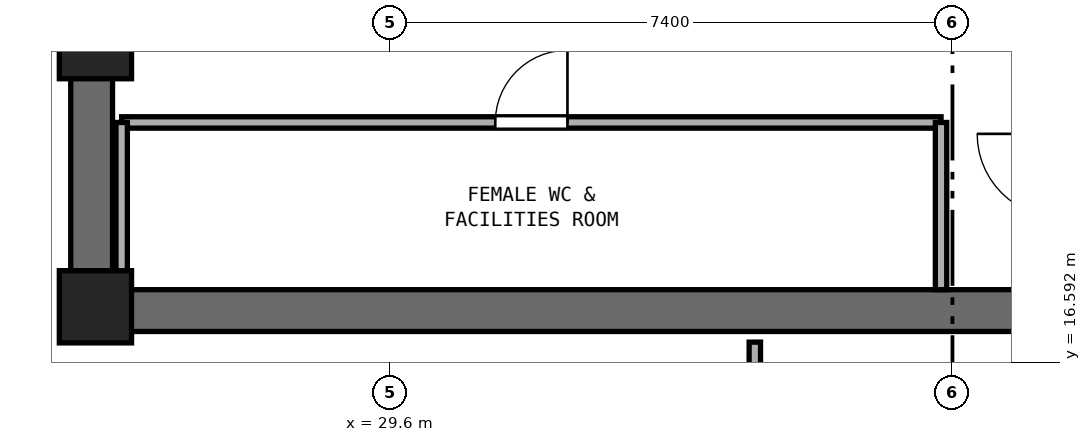
"""IFC4 building model, lengths in metres.
Left out: names, types, materials, properties, quantities, classifications, styles, units other than length and angle.
Written with IfcOpenShell. Run it as: python <this file> out.ifc"""

import sys

from ifc_helpers import new_model, si_unit, direction, frame, frame_2d, origin, origin_2d, place, context, subcontext, project, spatial, rectangle, extrude, element, fill, save


model = new_model("IFC4")
c1 = context("Model", 3, precision=1e-05, world=origin(), true_north=direction((0.0, 1.0)))
c2 = subcontext(c1, "Body", "Model", "MODEL_VIEW")
j1 = project(units=[si_unit("LENGTHUNIT", "METRE"), si_unit("PLANEANGLEUNIT", "RADIAN")], contexts=[c1])
p1 = place(None, origin())
s1 = spatial("IfcSite", under=j1, at=p1, CompositionType="ELEMENT")
p2 = place(p1, origin())
s2 = spatial("IfcBuilding", under=s1, at=p2, CompositionType="ELEMENT")
p3 = place(p2, frame((0.0, 0.0, 140.2)))
s3 = spatial("IfcBuildingStorey", under=s2, at=p3, CompositionType="ELEMENT", Elevation=140.2)
p4 = place(p3, frame((25.4, 17.275, 0.0), z_axis=(0.0, 0.0, 1.0), x_axis=(1.0, 0.0, 0.0)))
e1 = element("IfcWall", 1, at=p4, inside=s3, PredefinedType="SHEAR", context=c2, shape_type="SweptSolid", body=[
    extrude(rectangle(XDim=23.2, YDim=0.55, at=frame_2d((11.6, 0.0))), origin(), (0.0, 0.0, 1.0), 3.54),
])
p5 = place(p3, frame((25.675, 17.55, 0.0), z_axis=(0.0, 0.0, 1.0), x_axis=(0.0, 1.0, 0.0)))
e2 = element("IfcWall", 2, at=p5, inside=s3, PredefinedType="SHEAR", context=c2, shape_type="SweptSolid", body=[
    extrude(rectangle(XDim=15.3, YDim=0.55, at=frame_2d((7.65, 0.0))), origin(), (0.0, 0.0, 1.0), 3.54),
])
p6 = place(p5, frame((6.9, 0.0, 0.0)))
e3 = element("IfcOpeningElement", 3, at=p6, cuts=e2, PredefinedType="OPENING", context=c2, shape_type="SweptSolid", body=[
    extrude(rectangle(XDim=1.5, YDim=2.15, at=frame_2d((0.75, 1.075))), frame((0.0, 0.285, 0.0), z_axis=(0.0, -1.0, 0.0), x_axis=(1.0, 0.0, 0.0)), (0.0, 0.0, 1.0), 0.57),
])
for number, where, z_axis, x_axis in (
    (4, (25.725, 17.325, 0.0), (0.0, 0.0, 1.0), (1.0, 0.0, 0.0)),
    (5, (25.725, 20.8, 0.0), (0.0, 0.0, 1.0), (1.0, 0.0, 0.0)),
):
    element("IfcColumn", number, at=place(p3, frame(where, z_axis=z_axis, x_axis=x_axis)), inside=s3, PredefinedType="PILASTER", context=c2, shape_type="SweptSolid", body=[
        extrude(rectangle(XDim=0.95, YDim=0.95, at=origin_2d()), origin(), (0.0, 0.0, 1.0), 3.8),
    ])
p7 = place(p3, frame((26.07, 19.75, 0.0), z_axis=(0.0, 0.0, 1.0), x_axis=(1.0, 0.0, 0.0)))
e6 = element("IfcWall", 6, at=p7, inside=s3, PredefinedType="PARTITIONING", context=c2, shape_type="SweptSolid", body=[
    extrude(rectangle(XDim=10.78, YDim=0.15, at=frame_2d((5.39, 0.0))), origin(), (0.0, 0.0, 1.0), 3.54),
])
p8 = place(p7, frame((4.915, 0.0, 0.0)))
e7 = element("IfcOpeningElement", 7, at=p8, cuts=e6, PredefinedType="OPENING", context=c2, shape_type="SweptSolid", body=[
    extrude(rectangle(XDim=0.95, YDim=2.1, at=frame_2d((0.475, 1.05))), frame((0.0, 0.085, 0.0), z_axis=(0.0, -1.0, 0.0), x_axis=(1.0, 0.0, 0.0)), (0.0, 0.0, 1.0), 0.17),
])
p9 = place(p3, frame((26.07, 17.55, 0.0), z_axis=(0.0, 0.0, 1.0), x_axis=(0.0, 1.0, 0.0)))
e8 = element("IfcWall", 8, at=p9, inside=s3, PredefinedType="PARTITIONING", context=c2, shape_type="SweptSolid", body=[
    extrude(rectangle(XDim=2.2, YDim=0.15, at=frame_2d((1.1, 0.0))), origin(), (0.0, 0.0, 1.0), 2.64),
])
p10 = place(p3, frame((36.85, 17.55, 0.0), z_axis=(0.0, 0.0, 1.0), x_axis=(0.0, 1.0, 0.0)))
e9 = element("IfcWall", 9, at=p10, inside=s3, PredefinedType="PARTITIONING", context=c2, shape_type="SweptSolid", body=[
    extrude(rectangle(XDim=2.2, YDim=0.15, at=frame_2d((1.1, 0.0))), origin(), (0.0, 0.0, 1.0), 3.54),
])
p11 = place(p3, frame((34.4, 14.85, 0.0), z_axis=(0.0, 0.0, 1.0), x_axis=(0.0, 1.0, 0.0)))
e10 = element("IfcWall", 10, at=p11, inside=s3, PredefinedType="PARTITIONING", context=c2, shape_type="SweptSolid", body=[
    extrude(rectangle(XDim=2.01, YDim=0.15, at=frame_2d((1.005, 0.0))), origin(), (0.0, 0.0, 1.0), 3.54),
])
p12 = place(p8, origin())
e11 = element("IfcDoor", 11, at=p12, inside=s3, OperationType="SINGLE_SWING_RIGHT", PredefinedType="DOOR", context=c2, shape_type="SweptSolid", body=[
    extrude(rectangle(XDim=0.95, YDim=2.1, at=frame_2d((0.475, 1.05))), frame((0.0, 0.025, 0.0), z_axis=(0.0, -1.0, 0.0), x_axis=(1.0, 0.0, 0.0)), (0.0, 0.0, 1.0), 0.05),
])
fill(e7, e11)
save(model, sys.argv[1])
